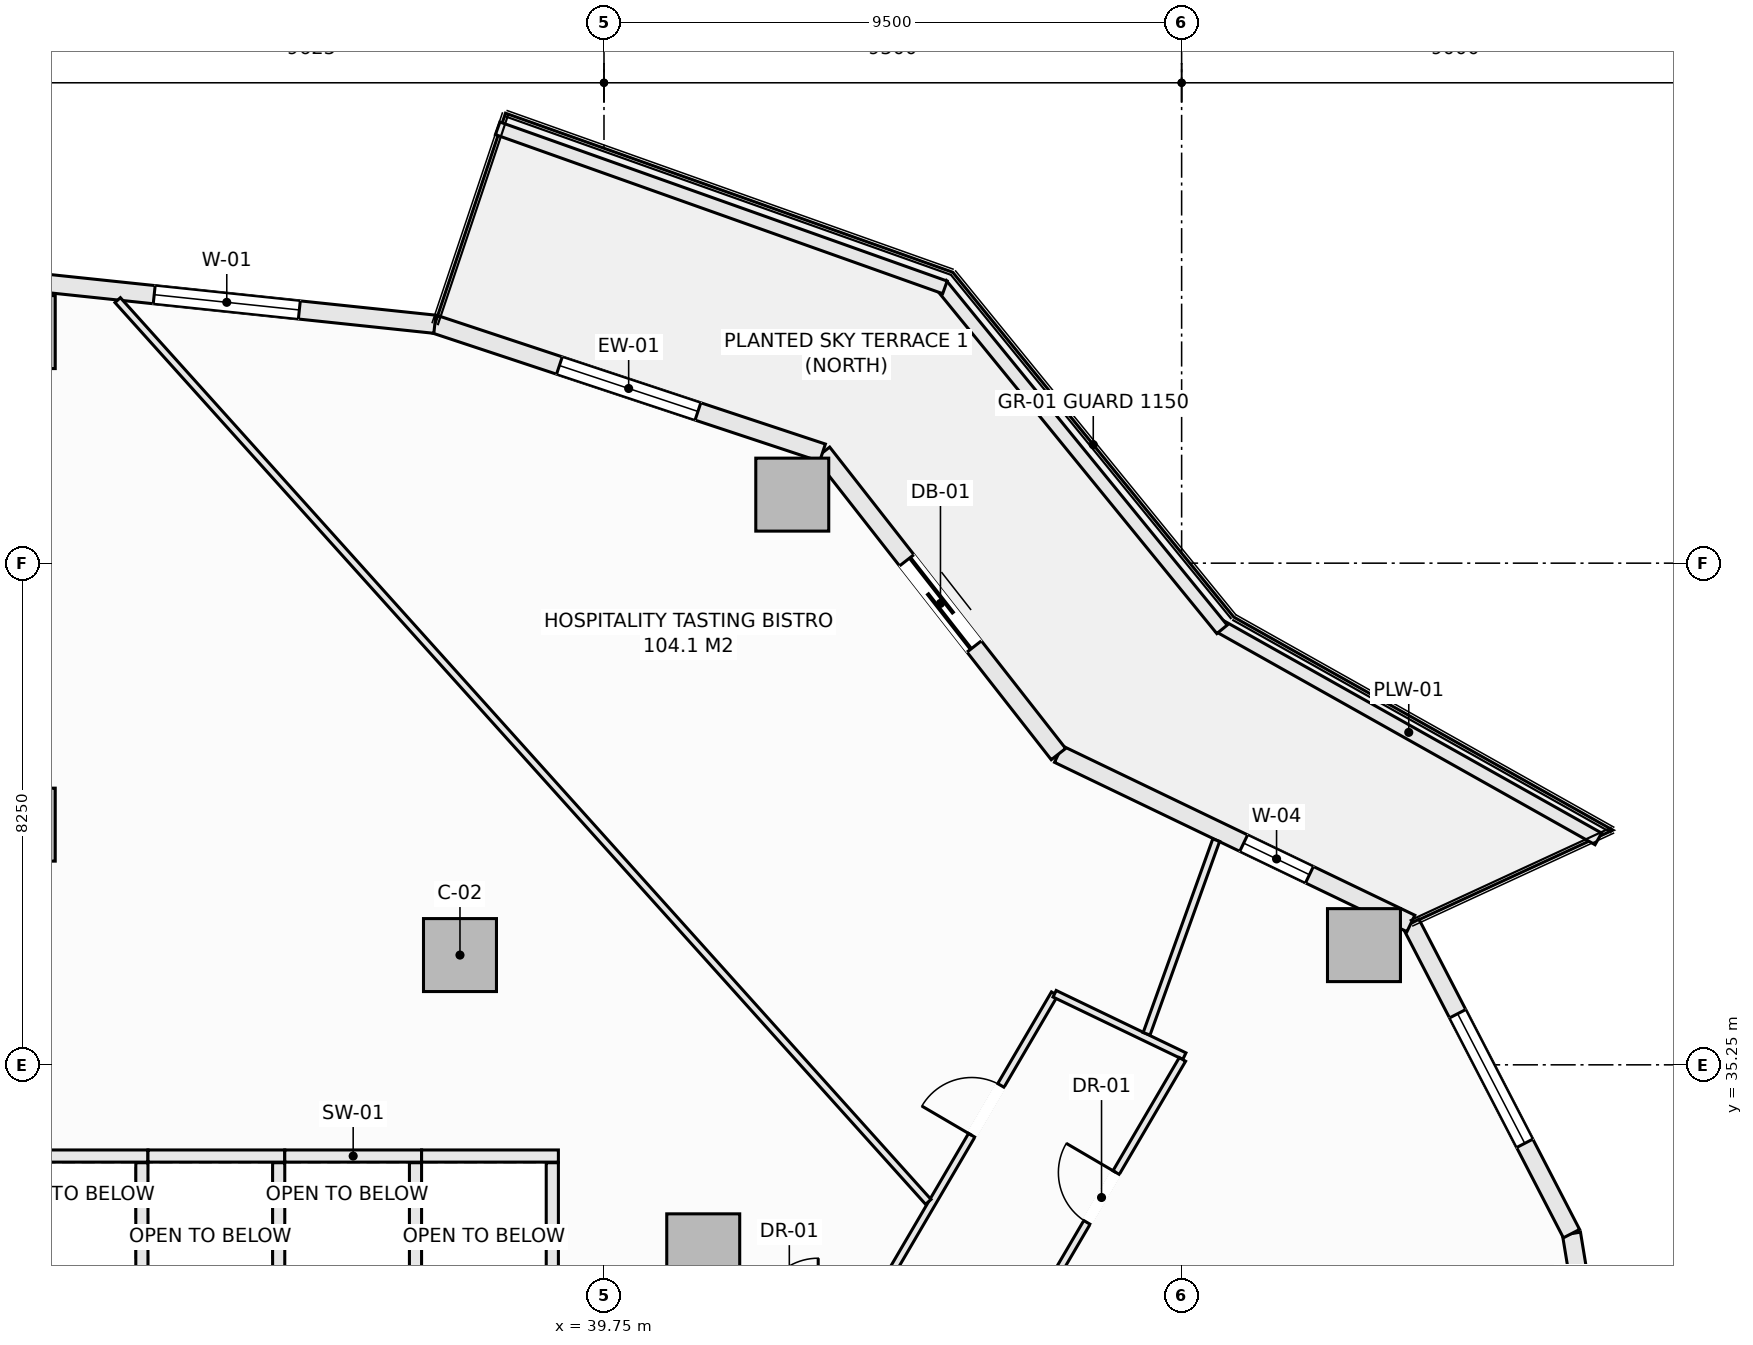
"""IFC4 building model, lengths in metres.
Left out: names, types, materials, properties, quantities, classifications, styles, units other than length and angle.
Written with IfcOpenShell. Run it as: python <this file> out.ifc"""

import sys

from ifc_helpers import new_model, si_unit, direction, frame, frame_2d, origin, origin_2d, place, context, subcontext, project, spatial, rectangle, extrude, element, fill, save


model = new_model("IFC4")
c1 = context("Model", 3, precision=1e-05, world=origin(), true_north=direction((0.0, 1.0)))
c2 = subcontext(c1, "Body", "Model", "MODEL_VIEW")
j1 = project(units=[si_unit("LENGTHUNIT", "METRE"), si_unit("PLANEANGLEUNIT", "RADIAN")], contexts=[c1])
p1 = place(None, origin())
s1 = spatial("IfcSite", under=j1, at=p1, CompositionType="ELEMENT")
p2 = place(p1, origin())
s2 = spatial("IfcBuilding", under=s1, at=p2, CompositionType="ELEMENT")
p3 = place(p2, frame((0.0, 0.0, 53.45)))
s3 = spatial("IfcBuildingStorey", under=s2, at=p3, CompositionType="ELEMENT", Elevation=53.45)
for number, where, z_axis, x_axis in (
    (1, (52.249, 37.219, -0.28), (0.0, 0.0, 1.0), (1.0, 0.0, 0.0)),
    (2, (42.846, 44.627, -0.28), (0.0, 0.0, 1.0), (1.0, 0.0, 0.0)),
    (3, (30.125, 47.3, -0.28), (0.0, 0.0, 1.0), (1.0, 0.0, 0.0)),
    (4, (41.382, 32.199, -0.28), (0.0, 0.0, 1.0), (1.0, 0.0, 0.0)),
    (5, (37.382, 37.055, -0.28), (0.0, 0.0, 1.0), (1.0, 0.0, 0.0)),
    (6, (30.125, 39.2, -0.28), (0.0, 0.0, 1.0), (1.0, 0.0, 0.0)),
):
    element("IfcColumn", number, at=place(p3, frame(where, z_axis=z_axis, x_axis=x_axis)), inside=s3, PredefinedType="COLUMN", context=c2, shape_type="SweptSolid", body=[
        extrude(rectangle(XDim=1.2, YDim=1.2, at=origin_2d()), origin(), (0.0, 0.0, 1.0), 3.85),
    ])
p4 = place(p3, frame((55.662, 32.474, 0.0), z_axis=(0.0, 0.0, 1.0), x_axis=(0.162386212206, -0.986727276447, 0.0)))
e7 = element("IfcWall", 7, at=p4, inside=s3, PredefinedType="SOLIDWALL", context=c2, shape_type="SweptSolid", body=[
    extrude(rectangle(XDim=5.548, YDim=0.3, at=frame_2d((2.774, 0.0))), origin(), (0.0, 0.0, 1.0), 3.093),
])
p5 = place(p4, frame((1.574, 0.0, 0.85)))
e8 = element("IfcOpeningElement", 8, at=p5, cuts=e7, PredefinedType="OPENING", context=c2, shape_type="SweptSolid", body=[
    extrude(rectangle(XDim=2.4, YDim=1.9, at=frame_2d((1.2, 0.95))), frame((0.0, 0.16, 0.0), z_axis=(0.0, -1.0, 0.0), x_axis=(1.0, 0.0, 0.0)), (0.0, 0.0, 1.0), 0.32),
])
p6 = place(p3, frame((53.021, 37.575, 0.0), z_axis=(0.0, 0.0, 1.0), x_axis=(0.459800981414, -0.888021991558, 0.0)))
e9 = element("IfcWall", 9, at=p6, inside=s3, PredefinedType="SOLIDWALL", context=c2, shape_type="SweptSolid", body=[
    extrude(rectangle(XDim=5.744, YDim=0.3, at=frame_2d((2.872, 0.0))), origin(), (0.0, 0.0, 1.0), 3.093),
])
p7 = place(p6, frame((1.672, 0.0, 0.85)))
e10 = element("IfcOpeningElement", 10, at=p7, cuts=e9, PredefinedType="OPENING", context=c2, shape_type="SweptSolid", body=[
    extrude(rectangle(XDim=2.4, YDim=1.9, at=frame_2d((1.2, 0.95))), frame((0.0, 0.16, 0.0), z_axis=(0.0, -1.0, 0.0), x_axis=(1.0, 0.0, 0.0)), (0.0, 0.0, 1.0), 0.32),
])
p8 = place(p3, frame((47.224, 40.36, 0.0), z_axis=(0.0, 0.0, 1.0), x_axis=(0.901354747727, -0.433081538224, 0.0)))
e11 = element("IfcWall", 11, at=p8, inside=s3, PredefinedType="SOLIDWALL", context=c2, shape_type="SweptSolid", body=[
    extrude(rectangle(XDim=6.431, YDim=0.3, at=frame_2d((3.215, 0.0))), origin(), (0.0, 0.0, 1.0), 3.093),
])
p9 = place(p8, frame((3.38, 0.0, 0.72)))
e12 = element("IfcOpeningElement", 12, at=p9, cuts=e11, PredefinedType="OPENING", context=c2, shape_type="SweptSolid", body=[
    extrude(rectangle(XDim=1.2, YDim=1.65, at=frame_2d((0.6, 0.825))), frame((0.0, 0.16, 0.0), z_axis=(0.0, -1.0, 0.0), x_axis=(1.0, 0.0, 0.0)), (0.0, 0.0, 1.0), 0.32),
])
p10 = place(p3, frame((43.344, 45.316, 0.0), z_axis=(0.0, 0.0, 1.0), x_axis=(0.616434798832, -0.78740595552, 0.0)))
e13 = element("IfcWall", 13, at=p10, inside=s3, PredefinedType="SOLIDWALL", context=c2, shape_type="SweptSolid", body=[
    extrude(rectangle(XDim=6.294, YDim=0.3, at=frame_2d((3.147, 0.0))), origin(), (0.0, 0.0, 1.0), 3.093),
])
p11 = place(p10, frame((2.247, 0.0, 0.0)))
e14 = element("IfcOpeningElement", 14, at=p11, cuts=e13, PredefinedType="OPENING", context=c2, shape_type="SweptSolid", body=[
    extrude(rectangle(XDim=1.8, YDim=2.25, at=frame_2d((0.9, 1.125))), frame((0.0, 0.16, 0.0), z_axis=(0.0, -1.0, 0.0), x_axis=(1.0, 0.0, 0.0)), (0.0, 0.0, 1.0), 0.32),
])
p12 = place(p3, frame((36.968, 47.429, 0.0), z_axis=(0.0, 0.0, 1.0), x_axis=(0.949245153629, -0.314537181127, 0.0)))
e15 = element("IfcWall", 15, at=p12, inside=s3, PredefinedType="SOLIDWALL", context=c2, shape_type="SweptSolid", body=[
    extrude(rectangle(XDim=6.717, YDim=0.3, at=frame_2d((3.358, 0.0))), origin(), (0.0, 0.0, 1.0), 3.093),
])
p13 = place(p12, frame((2.159, 0.0, 0.85)))
e16 = element("IfcOpeningElement", 16, at=p13, cuts=e15, PredefinedType="OPENING", context=c2, shape_type="SweptSolid", body=[
    extrude(rectangle(XDim=2.4, YDim=1.9, at=frame_2d((1.2, 0.95))), frame((0.0, 0.16, 0.0), z_axis=(0.0, -1.0, 0.0), x_axis=(1.0, 0.0, 0.0)), (0.0, 0.0, 1.0), 0.32),
])
p14 = place(p3, frame((30.125, 48.15, 0.0), z_axis=(0.0, 0.0, 1.0), x_axis=(0.994498840295, -0.104747585419, 0.0)))
e17 = element("IfcWall", 17, at=p14, inside=s3, PredefinedType="SOLIDWALL", context=c2, shape_type="SweptSolid", body=[
    extrude(rectangle(XDim=6.88, YDim=0.3, at=frame_2d((3.44, 0.0))), origin(), (0.0, 0.0, 1.0), 3.093),
])
p15 = place(p14, frame((2.24, 0.0, 0.85)))
e18 = element("IfcOpeningElement", 18, at=p15, cuts=e17, PredefinedType="OPENING", context=c2, shape_type="SweptSolid", body=[
    extrude(rectangle(XDim=2.4, YDim=1.9, at=frame_2d((1.2, 0.95))), frame((0.0, 0.16, 0.0), z_axis=(0.0, -1.0, 0.0), x_axis=(1.0, 0.0, 0.0)), (0.0, 0.0, 1.0), 0.32),
])
p16 = place(p3, frame((49.868, 42.469, 0.0), z_axis=(0.0, 0.0, 1.0), x_axis=(0.871775109335, -0.489906275468, 0.0)))
e19 = element("IfcWall", 19, at=p16, inside=s3, PredefinedType="PARAPET", context=c2, shape_type="SweptSolid", body=[
    extrude(rectangle(XDim=7.152, YDim=0.22, at=frame_2d((3.576, 0.0))), origin(), (0.0, 0.0, 1.0), 0.52),
])
p17 = place(p3, frame((45.292, 48.082, 0.0), z_axis=(0.0, 0.0, 1.0), x_axis=(0.631819273026, -0.775115737315, 0.0)))
e20 = element("IfcWall", 20, at=p17, inside=s3, PredefinedType="PARAPET", context=c2, shape_type="SweptSolid", body=[
    extrude(rectangle(XDim=7.316, YDim=0.22, at=frame_2d((3.658, 0.0))), origin(), (0.0, 0.0, 1.0), 0.52),
])
p18 = place(p3, frame((38.001, 50.651, 0.0), z_axis=(0.0, 0.0, 1.0), x_axis=(0.942203722205, -0.335040513764, 0.0)))
e21 = element("IfcWall", 21, at=p18, inside=s3, PredefinedType="PARAPET", context=c2, shape_type="SweptSolid", body=[
    extrude(rectangle(XDim=7.807, YDim=0.22, at=frame_2d((3.904, 0.0))), origin(), (0.0, 0.0, 1.0), 0.52),
])
p19 = place(p3, frame((29.8, 33.75, 0.0), z_axis=(0.0, 0.0, 1.0), x_axis=(1.0, 0.0, 0.0)))
e22 = element("IfcWall", 22, at=p19, inside=s3, PredefinedType="SOLIDWALL", context=c2, shape_type="SweptSolid", body=[
    extrude(rectangle(XDim=2.45, YDim=0.2, at=frame_2d((1.225, 0.0))), origin(), (0.0, 0.0, 1.0), 3.57),
])
p20 = place(p3, frame((32.15, 31.21, 0.0), z_axis=(0.0, 0.0, 1.0), x_axis=(0.0, 1.0, 0.0)))
e23 = element("IfcWall", 23, at=p20, inside=s3, PredefinedType="SOLIDWALL", context=c2, shape_type="SweptSolid", body=[
    extrude(rectangle(XDim=2.43, YDim=0.2, at=frame_2d((1.215, 0.0))), origin(), (0.0, 0.0, 1.0), 3.57),
])
p21 = place(p3, frame((32.25, 33.75, 0.0), z_axis=(0.0, 0.0, 1.0), x_axis=(1.0, 0.0, 0.0)))
e24 = element("IfcWall", 24, at=p21, inside=s3, PredefinedType="SOLIDWALL", context=c2, shape_type="SweptSolid", body=[
    extrude(rectangle(XDim=2.25, YDim=0.2, at=frame_2d((1.125, 0.0))), origin(), (0.0, 0.0, 1.0), 3.57),
])
p22 = place(p3, frame((34.4, 31.21, 0.0), z_axis=(0.0, 0.0, 1.0), x_axis=(0.0, 1.0, 0.0)))
e25 = element("IfcWall", 25, at=p22, inside=s3, PredefinedType="SOLIDWALL", context=c2, shape_type="SweptSolid", body=[
    extrude(rectangle(XDim=2.43, YDim=0.2, at=frame_2d((1.215, 0.0))), origin(), (0.0, 0.0, 1.0), 3.57),
])
p23 = place(p3, frame((34.5, 33.75, 0.0), z_axis=(0.0, 0.0, 1.0), x_axis=(1.0, 0.0, 0.0)))
e26 = element("IfcWall", 26, at=p23, inside=s3, PredefinedType="SOLIDWALL", context=c2, shape_type="SweptSolid", body=[
    extrude(rectangle(XDim=2.25, YDim=0.2, at=frame_2d((1.125, 0.0))), origin(), (0.0, 0.0, 1.0), 3.57),
])
p24 = place(p3, frame((36.65, 31.21, 0.0), z_axis=(0.0, 0.0, 1.0), x_axis=(0.0, 1.0, 0.0)))
e27 = element("IfcWall", 27, at=p24, inside=s3, PredefinedType="SOLIDWALL", context=c2, shape_type="SweptSolid", body=[
    extrude(rectangle(XDim=2.43, YDim=0.2, at=frame_2d((1.215, 0.0))), origin(), (0.0, 0.0, 1.0), 3.57),
])
p25 = place(p3, frame((36.75, 33.75, 0.0), z_axis=(0.0, 0.0, 1.0), x_axis=(1.0, 0.0, 0.0)))
e28 = element("IfcWall", 28, at=p25, inside=s3, PredefinedType="SOLIDWALL", context=c2, shape_type="SweptSolid", body=[
    extrude(rectangle(XDim=2.25, YDim=0.2, at=frame_2d((1.125, 0.0))), origin(), (0.0, 0.0, 1.0), 3.57),
])
p26 = place(p3, frame((38.9, 31.21, 0.0), z_axis=(0.0, 0.0, 1.0), x_axis=(0.0, 1.0, 0.0)))
e29 = element("IfcWall", 29, at=p26, inside=s3, PredefinedType="SOLIDWALL", context=c2, shape_type="SweptSolid", body=[
    extrude(rectangle(XDim=2.43, YDim=0.2, at=frame_2d((1.215, 0.0))), origin(), (0.0, 0.0, 1.0), 3.57),
])
p27 = place(p3, frame((44.056, 31.12, 0.0), z_axis=(0.0, 0.0, 1.0), x_axis=(0.505570543943, 0.86278527172, 0.0)))
e30 = element("IfcWall", 30, at=p27, inside=s3, PredefinedType="PARTITIONING", context=c2, shape_type="SweptSolid", body=[
    extrude(rectangle(XDim=6.142, YDim=0.12, at=frame_2d((3.071, 0.0))), origin(), (0.0, 0.0, 1.0), 3.205),
])
p28 = place(p27, frame((3.444, 0.0, 0.0)))
e31 = element("IfcOpeningElement", 31, at=p28, cuts=e30, PredefinedType="OPENING", context=c2, shape_type="SweptSolid", body=[
    extrude(rectangle(XDim=0.95, YDim=2.1, at=frame_2d((0.475, 1.05))), frame((0.0, 0.07, 0.0), z_axis=(0.0, -1.0, 0.0), x_axis=(1.0, 0.0, 0.0)), (0.0, 0.0, 1.0), 0.14),
])
p29 = place(p3, frame((47.161, 36.419, 0.0), z_axis=(0.0, 0.0, 1.0), x_axis=(0.901268684569, -0.433260612351, 0.0)))
e32 = element("IfcWall", 32, at=p29, inside=s3, PredefinedType="PARTITIONING", context=c2, shape_type="SweptSolid", body=[
    extrude(rectangle(XDim=2.368, YDim=0.12, at=frame_2d((1.184, 0.0))), origin(), (0.0, 0.0, 1.0), 3.57),
])
p30 = place(p3, frame((45.67, 29.207, 0.0), z_axis=(0.0, 0.0, 1.0), x_axis=(0.505582857323, 0.86277805627, 0.0)))
e33 = element("IfcWall", 33, at=p30, inside=s3, PredefinedType="PARTITIONING", context=c2, shape_type="SweptSolid", body=[
    extrude(rectangle(XDim=7.108, YDim=0.12, at=frame_2d((3.554, 0.0))), origin(), (0.0, 0.0, 1.0), 3.57),
])
p31 = place(p30, frame((4.0, 0.0, 0.0)))
e34 = element("IfcOpeningElement", 34, at=p31, cuts=e33, PredefinedType="OPENING", context=c2, shape_type="SweptSolid", body=[
    extrude(rectangle(XDim=0.95, YDim=2.1, at=frame_2d((0.475, 1.05))), frame((0.0, 0.07, 0.0), z_axis=(0.0, -1.0, 0.0), x_axis=(1.0, 0.0, 0.0)), (0.0, 0.0, 1.0), 0.14),
])
p32 = place(p3, frame((31.752, 47.826, 0.0), z_axis=(0.0, 0.0, 1.0), x_axis=(0.668565546791, -0.743653218674, 0.0)))
e35 = element("IfcWall", 35, at=p32, inside=s3, PredefinedType="PARTITIONING", context=c2, shape_type="SweptSolid", body=[
    extrude(rectangle(XDim=19.941, YDim=0.12, at=frame_2d((9.97, 0.0))), origin(), (0.0, 0.0, 1.0), 3.093),
])
p33 = place(p3, frame((48.674, 35.76, 0.0), z_axis=(0.0, 0.0, 1.0), x_axis=(0.338241657323, 0.941059286789, 0.0)))
e36 = element("IfcWall", 36, at=p33, inside=s3, PredefinedType="PARTITIONING", context=c2, shape_type="SweptSolid", body=[
    extrude(rectangle(XDim=3.384, YDim=0.12, at=frame_2d((1.692, 0.0))), origin(), (0.0, 0.0, 1.0), 3.57),
])
p34 = place(p7, origin())
e37 = element("IfcWindow", 37, at=p34, inside=s3, PartitioningType="SINGLE_PANEL", PredefinedType="WINDOW", context=c2, shape_type="SweptSolid", body=[
    extrude(rectangle(XDim=2.4, YDim=1.9, at=frame_2d((1.2, 0.95))), frame((0.0, 0.03, 0.0), z_axis=(0.0, -1.0, 0.0), x_axis=(1.0, 0.0, 0.0)), (0.0, 0.0, 1.0), 0.06),
])
fill(e10, e37)
p35 = place(p9, origin())
e38 = element("IfcWindow", 38, at=p35, inside=s3, PartitioningType="SINGLE_PANEL", PredefinedType="WINDOW", context=c2, shape_type="SweptSolid", body=[
    extrude(rectangle(XDim=1.2, YDim=1.65, at=frame_2d((0.6, 0.825))), frame((0.0, 0.03, 0.0), z_axis=(0.0, -1.0, 0.0), x_axis=(1.0, 0.0, 0.0)), (0.0, 0.0, 1.0), 0.06),
])
fill(e12, e38)
p36 = place(p11, origin())
e39 = element("IfcDoor", 39, at=p36, inside=s3, OperationType="SLIDING_TO_LEFT", PredefinedType="DOOR", context=c2, shape_type="SweptSolid", body=[
    extrude(rectangle(XDim=1.8, YDim=2.25, at=frame_2d((0.9, 1.125))), frame((0.0, 0.025, 0.0), z_axis=(0.0, -1.0, 0.0), x_axis=(1.0, 0.0, 0.0)), (0.0, 0.0, 1.0), 0.05),
])
fill(e14, e39)
p37 = place(p13, origin())
e40 = element("IfcWindow", 40, at=p37, inside=s3, PartitioningType="SINGLE_PANEL", PredefinedType="WINDOW", context=c2, shape_type="SweptSolid", body=[
    extrude(rectangle(XDim=2.4, YDim=1.9, at=frame_2d((1.2, 0.95))), frame((0.0, 0.03, 0.0), z_axis=(0.0, -1.0, 0.0), x_axis=(1.0, 0.0, 0.0)), (0.0, 0.0, 1.0), 0.06),
])
fill(e16, e40)
p38 = place(p15, origin())
e41 = element("IfcWindow", 41, at=p38, inside=s3, PartitioningType="SINGLE_PANEL", PredefinedType="WINDOW", context=c2, shape_type="SweptSolid", body=[
    extrude(rectangle(XDim=2.4, YDim=1.9, at=frame_2d((1.2, 0.95))), frame((0.0, 0.03, 0.0), z_axis=(0.0, -1.0, 0.0), x_axis=(1.0, 0.0, 0.0)), (0.0, 0.0, 1.0), 0.06),
])
fill(e18, e41)
p39 = place(p31, origin())
e42 = element("IfcDoor", 42, at=p39, inside=s3, OperationType="SINGLE_SWING_RIGHT", PredefinedType="DOOR", context=c2, shape_type="SweptSolid", body=[
    extrude(rectangle(XDim=0.95, YDim=2.1, at=frame_2d((0.475, 1.05))), frame((0.0, 0.025, 0.0), z_axis=(0.0, -1.0, 0.0), x_axis=(1.0, 0.0, 0.0)), (0.0, 0.0, 1.0), 0.05),
])
fill(e34, e42)
p40 = place(p28, origin())
e43 = element("IfcDoor", 43, at=p40, inside=s3, OperationType="SINGLE_SWING_LEFT", PredefinedType="DOOR", context=c2, shape_type="SweptSolid", body=[
    extrude(rectangle(XDim=0.95, YDim=2.1, at=frame_2d((0.475, 1.05))), frame((0.0, 0.025, 0.0), z_axis=(0.0, -1.0, 0.0), x_axis=(1.0, 0.0, 0.0)), (0.0, 0.0, 1.0), 0.05),
])
fill(e31, e43)
save(model, sys.argv[1])
